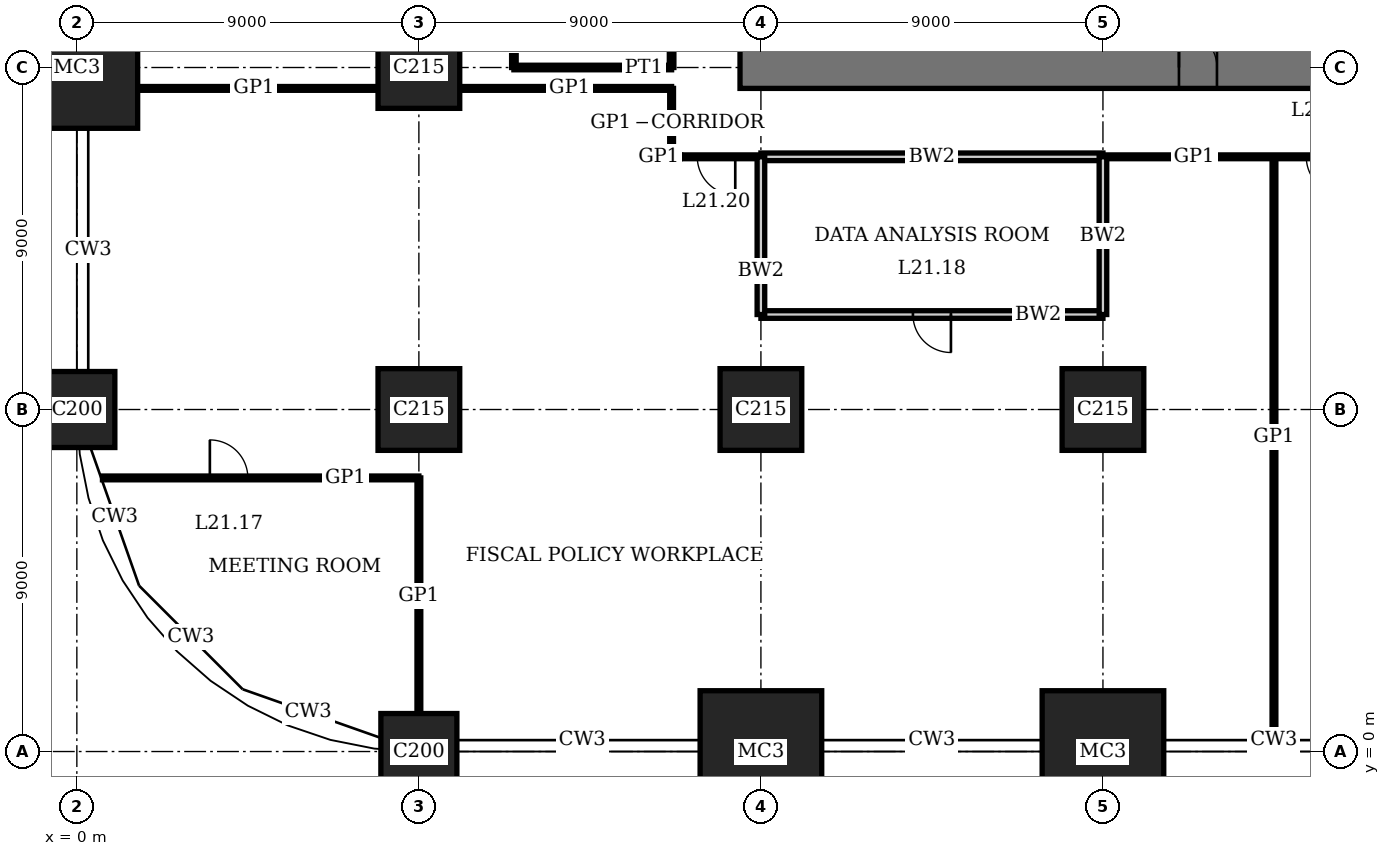
"""IFC4 building model, lengths in metres.
Left out: names, types, materials, properties, quantities, classifications, styles, units other than length and angle.
Written with IfcOpenShell. Run it as: python <this file> out.ifc"""

import sys

from ifc_helpers import new_model, si_unit, direction, frame, frame_2d, origin, origin_2d, place, context, subcontext, project, spatial, rectangle, extrude, element, fill, save


model = new_model("IFC4")
c1 = context("Model", 3, precision=1e-05, world=origin(), true_north=direction((0.0, 1.0)))
c2 = subcontext(c1, "Body", "Model", "MODEL_VIEW")
j1 = project(units=[si_unit("LENGTHUNIT", "METRE"), si_unit("PLANEANGLEUNIT", "RADIAN")], contexts=[c1])
p1 = place(None, origin())
s1 = spatial("IfcSite", under=j1, at=p1, CompositionType="ELEMENT")
p2 = place(p1, origin())
s2 = spatial("IfcBuilding", under=s1, at=p2, CompositionType="ELEMENT")
p3 = place(p2, frame((0.0, 0.0, 89.0)))
s3 = spatial("IfcBuildingStorey", under=s2, at=p3, CompositionType="ELEMENT", Elevation=89.0)
p4 = place(p3, frame((0.0, 9.0, 0.0), z_axis=(0.0, 0.0, 1.0), x_axis=(1.0, 0.0, 0.0)))
e1 = element("IfcColumn", 1, at=p4, inside=s3, PredefinedType="COLUMN", context=c2, shape_type="SweptSolid", body=[
    extrude(rectangle(XDim=2.0, YDim=2.0, at=origin_2d()), origin(), (0.0, 0.0, 1.0), 4.0),
])
p5 = place(p3, frame((0.0, 18.0, 0.0), z_axis=(0.0, 0.0, 1.0), x_axis=(1.0, 0.0, 0.0)))
e2 = element("IfcColumn", 2, at=p5, inside=s3, PredefinedType="COLUMN", context=c2, shape_type="SweptSolid", body=[
    extrude(rectangle(XDim=3.2, YDim=3.2, at=origin_2d()), origin(), (0.0, 0.0, 1.0), 4.0),
])
p6 = place(p3, frame((9.0, 0.0, 0.0), z_axis=(0.0, 0.0, 1.0), x_axis=(1.0, 0.0, 0.0)))
e3 = element("IfcColumn", 3, at=p6, inside=s3, PredefinedType="COLUMN", context=c2, shape_type="SweptSolid", body=[
    extrude(rectangle(XDim=2.0, YDim=2.0, at=origin_2d()), origin(), (0.0, 0.0, 1.0), 4.0),
])
for number, where, z_axis, x_axis in (
    (4, (9.0, 9.0, 0.0), (0.0, 0.0, 1.0), (1.0, 0.0, 0.0)),
    (5, (9.0, 18.0, 0.0), (0.0, 0.0, 1.0), (1.0, 0.0, 0.0)),
):
    element("IfcColumn", number, at=place(p3, frame(where, z_axis=z_axis, x_axis=x_axis)), inside=s3, PredefinedType="COLUMN", context=c2, shape_type="SweptSolid", body=[
        extrude(rectangle(XDim=2.15, YDim=2.15, at=origin_2d()), origin(), (0.0, 0.0, 1.0), 4.0),
    ])
p7 = place(p3, frame((18.0, 0.0, 0.0), z_axis=(0.0, 0.0, 1.0), x_axis=(1.0, 0.0, 0.0)))
e6 = element("IfcColumn", 6, at=p7, inside=s3, PredefinedType="COLUMN", context=c2, shape_type="SweptSolid", body=[
    extrude(rectangle(XDim=3.2, YDim=3.2, at=origin_2d()), origin(), (0.0, 0.0, 1.0), 4.0),
])
p8 = place(p3, frame((18.0, 9.0, 0.0), z_axis=(0.0, 0.0, 1.0), x_axis=(1.0, 0.0, 0.0)))
e7 = element("IfcColumn", 7, at=p8, inside=s3, PredefinedType="COLUMN", context=c2, shape_type="SweptSolid", body=[
    extrude(rectangle(XDim=2.15, YDim=2.15, at=origin_2d()), origin(), (0.0, 0.0, 1.0), 4.0),
])
p9 = place(p3, frame((27.0, 0.0, 0.0), z_axis=(0.0, 0.0, 1.0), x_axis=(1.0, 0.0, 0.0)))
e8 = element("IfcColumn", 8, at=p9, inside=s3, PredefinedType="COLUMN", context=c2, shape_type="SweptSolid", body=[
    extrude(rectangle(XDim=3.2, YDim=3.2, at=origin_2d()), origin(), (0.0, 0.0, 1.0), 4.0),
])
p10 = place(p3, frame((27.0, 9.0, 0.0), z_axis=(0.0, 0.0, 1.0), x_axis=(1.0, 0.0, 0.0)))
e9 = element("IfcColumn", 9, at=p10, inside=s3, PredefinedType="COLUMN", context=c2, shape_type="SweptSolid", body=[
    extrude(rectangle(XDim=2.15, YDim=2.15, at=origin_2d()), origin(), (0.0, 0.0, 1.0), 4.0),
])
p11 = place(p3, frame((17.45, 18.0, 0.0), z_axis=(0.0, 0.0, 1.0), x_axis=(1.0, 0.0, 0.0)))
e10 = element("IfcWall", 10, at=p11, inside=s3, PredefinedType="SHEAR", context=c2, shape_type="SweptSolid", body=[
    extrude(rectangle(XDim=28.1, YDim=1.1, at=frame_2d((14.05, 0.0))), origin(), (0.0, 0.0, 1.0), 4.0),
])
p12 = place(p11, frame((11.55, 0.0, 0.0)))
e11 = element("IfcOpeningElement", 11, at=p12, cuts=e10, PredefinedType="OPENING", context=c2, shape_type="SweptSolid", body=[
    extrude(rectangle(XDim=1.0, YDim=2.4, at=frame_2d((0.5, 1.2))), frame((0.0, 0.56, 0.0), z_axis=(0.0, -1.0, 0.0), x_axis=(1.0, 0.0, 0.0)), (0.0, 0.0, 1.0), 1.12),
])
p13 = place(p11, frame((16.55, 0.0, 0.0)))
e12 = element("IfcOpeningElement", 12, at=p13, cuts=e10, PredefinedType="OPENING", context=c2, shape_type="SweptSolid", body=[
    extrude(rectangle(XDim=1.0, YDim=2.4, at=frame_2d((0.5, 1.2))), frame((0.0, 0.56, 0.0), z_axis=(0.0, -1.0, 0.0), x_axis=(1.0, 0.0, 0.0)), (0.0, 0.0, 1.0), 1.12),
])
p14 = place(p11, frame((20.0, 0.0, 0.0)))
e13 = element("IfcOpeningElement", 13, at=p14, cuts=e10, PredefinedType="OPENING", context=c2, shape_type="SweptSolid", body=[
    extrude(rectangle(XDim=1.1, YDim=2.4, at=frame_2d((0.55, 1.2))), frame((0.0, 0.56, 0.0), z_axis=(0.0, -1.0, 0.0), x_axis=(1.0, 0.0, 0.0)), (0.0, 0.0, 1.0), 1.12),
])
p15 = place(p11, frame((24.05, 0.0, 0.0)))
e14 = element("IfcOpeningElement", 14, at=p15, cuts=e10, PredefinedType="OPENING", context=c2, shape_type="SweptSolid", body=[
    extrude(rectangle(XDim=1.0, YDim=2.4, at=frame_2d((0.5, 1.2))), frame((0.0, 0.56, 0.0), z_axis=(0.0, -1.0, 0.0), x_axis=(1.0, 0.0, 0.0)), (0.0, 0.0, 1.0), 1.12),
])
p16 = place(p3, frame((0.674, 7.2, 0.0), z_axis=(0.0, 0.0, 1.0), x_axis=(1.0, 0.0, 0.0)))
e15 = element("IfcWall", 15, at=p16, inside=s3, PredefinedType="PARTITIONING", context=c2, shape_type="SweptSolid", body=[
    extrude(rectangle(XDim=8.326, YDim=0.1, at=frame_2d((4.163, 0.0))), origin(), (0.0, 0.0, 1.0), 3.75),
])
p17 = place(p16, frame((2.826, 0.0, 0.0)))
e16 = element("IfcOpeningElement", 16, at=p17, cuts=e15, PredefinedType="OPENING", context=c2, shape_type="SweptSolid", body=[
    extrude(rectangle(XDim=1.0, YDim=2.4, at=frame_2d((0.5, 1.2))), frame((0.0, 0.06, 0.0), z_axis=(0.0, -1.0, 0.0), x_axis=(1.0, 0.0, 0.0)), (0.0, 0.0, 1.0), 0.12),
])
p18 = place(p3, frame((18.0, 11.5, 0.0), z_axis=(0.0, 0.0, 1.0), x_axis=(1.0, 0.0, 0.0)))
e17 = element("IfcWall", 17, at=p18, inside=s3, PredefinedType="SOLIDWALL", context=c2, shape_type="SweptSolid", body=[
    extrude(rectangle(XDim=9.0, YDim=0.2, at=frame_2d((4.5, 0.0))), origin(), (0.0, 0.0, 1.0), 3.75),
])
p19 = place(p18, frame((4.0, 0.0, 0.0)))
e18 = element("IfcOpeningElement", 18, at=p19, cuts=e17, PredefinedType="OPENING", context=c2, shape_type="SweptSolid", body=[
    extrude(rectangle(XDim=1.0, YDim=2.4, at=frame_2d((0.5, 1.2))), frame((0.0, 0.11, 0.0), z_axis=(0.0, -1.0, 0.0), x_axis=(1.0, 0.0, 0.0)), (0.0, 0.0, 1.0), 0.22),
])
p20 = place(p3, frame((18.0, 15.65, 0.0), z_axis=(0.0, 0.0, 1.0), x_axis=(1.0, 0.0, 0.0)))
e19 = element("IfcWall", 19, at=p20, inside=s3, PredefinedType="SOLIDWALL", context=c2, shape_type="SweptSolid", body=[
    extrude(rectangle(XDim=9.0, YDim=0.2, at=frame_2d((4.5, 0.0))), origin(), (0.0, 0.0, 1.0), 3.75),
])
p21 = place(p3, frame((15.65, 15.65, 0.0), z_axis=(0.0, 0.0, 1.0), x_axis=(1.0, 0.0, 0.0)))
e20 = element("IfcWall", 20, at=p21, inside=s3, PredefinedType="PARTITIONING", context=c2, shape_type="SweptSolid", body=[
    extrude(rectangle(XDim=2.35, YDim=0.1, at=frame_2d((1.175, 0.0))), origin(), (0.0, 0.0, 1.0), 3.75),
])
p22 = place(p21, frame((0.675, 0.0, 0.0)))
e21 = element("IfcOpeningElement", 21, at=p22, cuts=e20, PredefinedType="OPENING", context=c2, shape_type="SweptSolid", body=[
    extrude(rectangle(XDim=1.0, YDim=2.4, at=frame_2d((0.5, 1.2))), frame((0.0, 0.06, 0.0), z_axis=(0.0, -1.0, 0.0), x_axis=(1.0, 0.0, 0.0)), (0.0, 0.0, 1.0), 0.12),
])
p23 = place(p3, frame((27.0, 15.65, 0.0), z_axis=(0.0, 0.0, 1.0), x_axis=(1.0, 0.0, 0.0)))
e22 = element("IfcWall", 22, at=p23, inside=s3, PredefinedType="PARTITIONING", context=c2, shape_type="SweptSolid", body=[
    extrude(rectangle(XDim=9.0, YDim=0.1, at=frame_2d((4.5, 0.0))), origin(), (0.0, 0.0, 1.0), 3.75),
])
p24 = place(p23, frame((5.35, 0.0, 0.0)))
e23 = element("IfcOpeningElement", 23, at=p24, cuts=e22, PredefinedType="OPENING", context=c2, shape_type="SweptSolid", body=[
    extrude(rectangle(XDim=1.0, YDim=2.4, at=frame_2d((0.5, 1.2))), frame((0.0, 0.06, 0.0), z_axis=(0.0, -1.0, 0.0), x_axis=(1.0, 0.0, 0.0)), (0.0, 0.0, 1.0), 0.12),
])
p25 = place(p3, frame((1.6, 17.45, 0.0), z_axis=(0.0, 0.0, 1.0), x_axis=(1.0, 0.0, 0.0)))
e24 = element("IfcWall", 24, at=p25, inside=s3, PredefinedType="PARTITIONING", context=c2, shape_type="SweptSolid", body=[
    extrude(rectangle(XDim=6.325, YDim=0.1, at=frame_2d((3.163, 0.0))), origin(), (0.0, 0.0, 1.0), 3.75),
])
p26 = place(p3, frame((10.075, 17.45, 0.0), z_axis=(0.0, 0.0, 1.0), x_axis=(1.0, 0.0, 0.0)))
e25 = element("IfcWall", 25, at=p26, inside=s3, PredefinedType="PARTITIONING", context=c2, shape_type="SweptSolid", body=[
    extrude(rectangle(XDim=5.575, YDim=0.1, at=frame_2d((2.788, 0.0))), origin(), (0.0, 0.0, 1.0), 3.75),
])
p27 = place(p3, frame((11.5, 18.0, 0.0), z_axis=(0.0, 0.0, 1.0), x_axis=(1.0, 0.0, 0.0)))
e26 = element("IfcWall", 26, at=p27, inside=s3, PredefinedType="PARTITIONING", context=c2, shape_type="SweptSolid", body=[
    extrude(rectangle(XDim=4.15, YDim=0.12, at=frame_2d((2.075, 0.0))), origin(), (0.0, 0.0, 1.0), 3.05),
])
p28 = place(p3, frame((9.0, 1.0, 0.0), z_axis=(0.0, 0.0, 1.0), x_axis=(0.0, 1.0, 0.0)))
e27 = element("IfcWall", 27, at=p28, inside=s3, PredefinedType="PARTITIONING", context=c2, shape_type="SweptSolid", body=[
    extrude(rectangle(XDim=6.2, YDim=0.1, at=frame_2d((3.1, 0.0))), origin(), (0.0, 0.0, 1.0), 3.05),
])
p29 = place(p3, frame((11.5, 18.0, 0.0), z_axis=(0.0, 0.0, 1.0), x_axis=(0.0, 1.0, 0.0)))
e28 = element("IfcWall", 28, at=p29, inside=s3, PredefinedType="PARTITIONING", context=c2, shape_type="SweptSolid", body=[
    extrude(rectangle(XDim=4.5, YDim=0.12, at=frame_2d((2.25, 0.0))), origin(), (0.0, 0.0, 1.0), 3.75),
])
p30 = place(p29, frame((1.75, 0.0, 0.0)))
e29 = element("IfcOpeningElement", 29, at=p30, cuts=e28, PredefinedType="OPENING", context=c2, shape_type="SweptSolid", body=[
    extrude(rectangle(XDim=1.0, YDim=2.4, at=frame_2d((0.5, 1.2))), frame((0.0, 0.07, 0.0), z_axis=(0.0, -1.0, 0.0), x_axis=(1.0, 0.0, 0.0)), (0.0, 0.0, 1.0), 0.14),
])
p31 = place(p3, frame((15.65, 18.0, 0.0), z_axis=(0.0, 0.0, 1.0), x_axis=(0.0, 1.0, 0.0)))
e30 = element("IfcWall", 30, at=p31, inside=s3, PredefinedType="PARTITIONING", context=c2, shape_type="SweptSolid", body=[
    extrude(rectangle(XDim=4.5, YDim=0.12, at=frame_2d((2.25, 0.0))), origin(), (0.0, 0.0, 1.0), 3.75),
])
p32 = place(p3, frame((15.65, 15.65, 0.0), z_axis=(0.0, 0.0, 1.0), x_axis=(0.0, 1.0, 0.0)))
e31 = element("IfcWall", 31, at=p32, inside=s3, PredefinedType="PARTITIONING", context=c2, shape_type="SweptSolid", body=[
    extrude(rectangle(XDim=1.8, YDim=0.1, at=frame_2d((0.9, 0.0))), origin(), (0.0, 0.0, 1.0), 3.75),
])
for number, where, z_axis, x_axis in (
    (32, (18.0, 11.5, 0.0), (0.0, 0.0, 1.0), (0.0, 1.0, 0.0)),
    (33, (27.0, 11.5, 0.0), (0.0, 0.0, 1.0), (0.0, 1.0, 0.0)),
):
    element("IfcWall", number, at=place(p3, frame(where, z_axis=z_axis, x_axis=x_axis)), inside=s3, PredefinedType="SOLIDWALL", context=c2, shape_type="SweptSolid", body=[
        extrude(rectangle(XDim=4.15, YDim=0.2, at=frame_2d((2.075, 0.0))), origin(), (0.0, 0.0, 1.0), 3.05),
    ])
p33 = place(p3, frame((31.5, 0.31, 0.0), z_axis=(0.0, 0.0, 1.0), x_axis=(0.0, 1.0, 0.0)))
e34 = element("IfcWall", 34, at=p33, inside=s3, PredefinedType="PARTITIONING", context=c2, shape_type="SweptSolid", body=[
    extrude(rectangle(XDim=15.34, YDim=0.1, at=frame_2d((7.67, 0.0))), origin(), (0.0, 0.0, 1.0), 3.75),
])
p34 = place(p12, origin())
e35 = element("IfcDoor", 35, at=p34, inside=s3, OperationType="SINGLE_SWING_RIGHT", PredefinedType="DOOR", context=c2, shape_type="SweptSolid", body=[
    extrude(rectangle(XDim=1.0, YDim=2.4, at=frame_2d((0.5, 1.2))), frame((0.0, 0.025, 0.0), z_axis=(0.0, -1.0, 0.0), x_axis=(1.0, 0.0, 0.0)), (0.0, 0.0, 1.0), 0.05),
    extrude(rectangle(XDim=0.04, YDim=2.4, at=frame_2d((0.02, 1.2))), frame((0.0, 0.4, 0.0), z_axis=(0.0, -1.0, 0.0), x_axis=(1.0, 0.0, 0.0)), (0.0, 0.0, 1.0), 0.8),
    extrude(rectangle(XDim=0.04, YDim=2.4, at=frame_2d((0.98, 1.2))), frame((0.0, 0.4, 0.0), z_axis=(0.0, -1.0, 0.0), x_axis=(1.0, 0.0, 0.0)), (0.0, 0.0, 1.0), 0.8),
    extrude(rectangle(XDim=1.0, YDim=0.04, at=frame_2d((0.5, 2.38))), frame((0.0, 0.4, 0.0), z_axis=(0.0, -1.0, 0.0), x_axis=(1.0, 0.0, 0.0)), (0.0, 0.0, 1.0), 0.8),
])
fill(e11, e35)
p35 = place(p17, origin())
e36 = element("IfcDoor", 36, at=p35, inside=s3, OperationType="SINGLE_SWING_RIGHT", PredefinedType="DOOR", context=c2, shape_type="SweptSolid", body=[
    extrude(rectangle(XDim=1.0, YDim=2.4, at=frame_2d((0.5, 1.2))), frame((0.0, 0.02, 0.0), z_axis=(0.0, -1.0, 0.0), x_axis=(1.0, 0.0, 0.0)), (0.0, 0.0, 1.0), 0.04),
])
fill(e16, e36)
p36 = place(p19, origin())
e37 = element("IfcDoor", 37, at=p36, inside=s3, OperationType="SINGLE_SWING_RIGHT", PredefinedType="DOOR", context=c2, shape_type="SweptSolid", body=[
    extrude(rectangle(XDim=1.0, YDim=2.4, at=frame_2d((0.5, 1.2))), frame((0.0, 0.035, 0.0), z_axis=(0.0, -1.0, 0.0), x_axis=(1.0, 0.0, 0.0)), (0.0, 0.0, 1.0), 0.07),
])
fill(e18, e37)
p37 = place(p22, origin())
e38 = element("IfcDoor", 38, at=p37, inside=s3, OperationType="SINGLE_SWING_RIGHT", PredefinedType="DOOR", context=c2, shape_type="SweptSolid", body=[
    extrude(rectangle(XDim=1.0, YDim=2.4, at=frame_2d((0.5, 1.2))), frame((0.0, 0.02, 0.0), z_axis=(0.0, -1.0, 0.0), x_axis=(1.0, 0.0, 0.0)), (0.0, 0.0, 1.0), 0.04),
])
fill(e21, e38)
p38 = place(p24, origin())
e39 = element("IfcDoor", 39, at=p38, inside=s3, OperationType="SINGLE_SWING_RIGHT", PredefinedType="DOOR", context=c2, shape_type="SweptSolid", body=[
    extrude(rectangle(XDim=1.0, YDim=2.4, at=frame_2d((0.5, 1.2))), frame((0.0, 0.02, 0.0), z_axis=(0.0, -1.0, 0.0), x_axis=(1.0, 0.0, 0.0)), (0.0, 0.0, 1.0), 0.04),
])
fill(e23, e39)
save(model, sys.argv[1])
